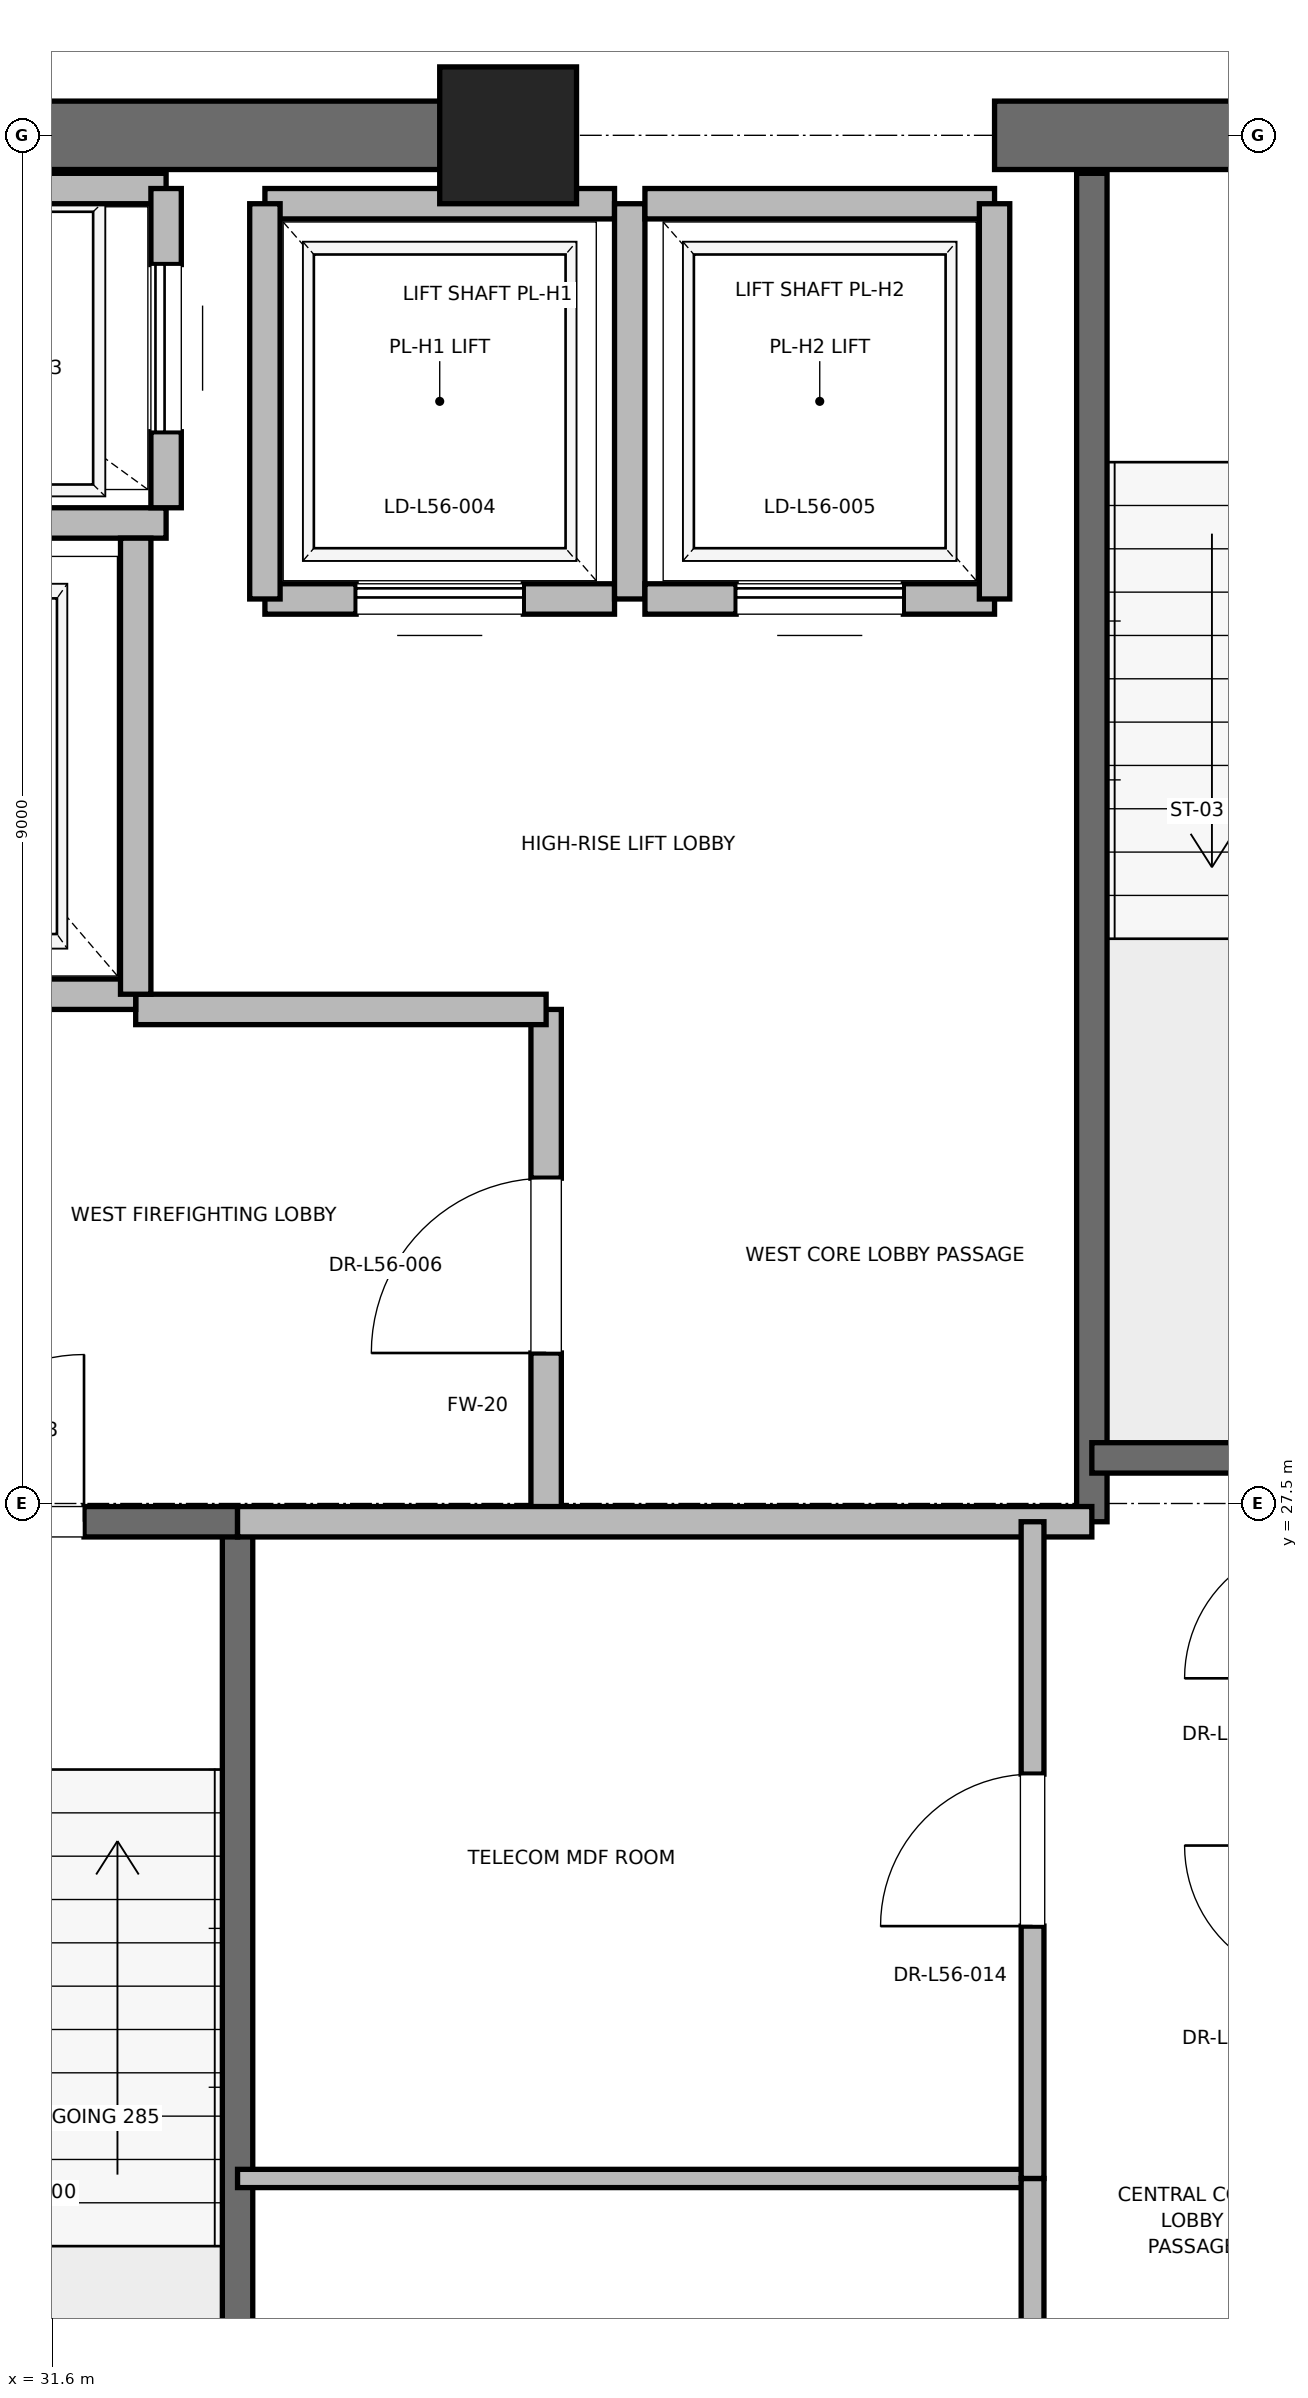
"""IFC4 building model, lengths in metres.
Left out: names, types, materials, properties, quantities, classifications, styles, units other than length and angle.
Written with IfcOpenShell. Run it as: python <this file> out.ifc"""

import sys

from ifc_helpers import new_model, si_unit, direction, frame, frame_2d, origin, origin_2d, place, context, subcontext, project, spatial, rectangle, extrude, element, fill, save


model = new_model("IFC4")
c1 = context("Model", 3, precision=1e-05, world=origin(), true_north=direction((0.0, 1.0)))
c2 = subcontext(c1, "Body", "Model", "MODEL_VIEW")
j1 = project(units=[si_unit("LENGTHUNIT", "METRE"), si_unit("PLANEANGLEUNIT", "RADIAN")], contexts=[c1])
p1 = place(None, origin())
s1 = spatial("IfcSite", under=j1, at=p1, CompositionType="ELEMENT")
p2 = place(p1, origin())
s2 = spatial("IfcBuilding", under=s1, at=p2, CompositionType="ELEMENT")
p3 = place(p2, frame((0.0, 0.0, 243.2)))
s3 = spatial("IfcBuildingStorey", under=s2, at=p3, CompositionType="ELEMENT", Elevation=243.2)
p4 = place(p3, frame((34.6, 36.5, 0.0), z_axis=(0.0, 0.0, 1.0), x_axis=(1.0, 0.0, 0.0)))
e1 = element("IfcColumn", 1, at=p4, inside=s3, PredefinedType="PILASTER", context=c2, shape_type="SweptSolid", body=[
    extrude(rectangle(XDim=0.9, YDim=0.9, at=origin_2d()), origin(), (0.0, 0.0, 1.0), 4.0),
])
p5 = place(p3, frame((29.0, 36.5, 0.0), z_axis=(0.0, 0.0, 1.0), x_axis=(1.0, 0.0, 0.0)))
e2 = element("IfcWall", 2, at=p5, inside=s3, PredefinedType="SHEAR", context=c2, shape_type="SweptSolid", body=[
    extrude(rectangle(XDim=5.8, YDim=0.45, at=frame_2d((2.9, 0.0))), origin(), (0.0, 0.0, 1.0), 3.785),
])
p6 = place(p3, frame((37.8, 36.5, 0.0), z_axis=(0.0, 0.0, 1.0), x_axis=(1.0, 0.0, 0.0)))
e3 = element("IfcWall", 3, at=p6, inside=s3, PredefinedType="SHEAR", context=c2, shape_type="SweptSolid", body=[
    extrude(rectangle(XDim=4.4, YDim=0.45, at=frame_2d((2.2, 0.0))), origin(), (0.0, 0.0, 1.0), 3.785),
])
p7 = place(p6, frame((1.65, 0.0, 0.0)))
e4 = element("IfcOpeningElement", 4, at=p7, cuts=e3, PredefinedType="OPENING", context=c2, shape_type="SweptSolid", body=[
    extrude(rectangle(XDim=1.1, YDim=2.15, at=frame_2d((0.55, 1.075))), frame((0.0, 0.225, 0.0), z_axis=(0.0, -1.0, 0.0), x_axis=(1.0, 0.0, 0.0)), (0.0, 0.0, 1.0), 0.45),
])
p8 = place(p3, frame((32.82, 18.6, 0.0), z_axis=(0.0, 0.0, 1.0), x_axis=(0.0, 1.0, 0.0)))
e5 = element("IfcWall", 5, at=p8, inside=s3, PredefinedType="SOLIDWALL", context=c2, shape_type="SweptSolid", body=[
    extrude(rectangle(XDim=8.78, YDim=0.2, at=frame_2d((4.39, 0.0))), origin(), (0.0, 0.0, 1.0), 3.785),
])
p9 = place(p3, frame((29.7, 27.38, 0.0), z_axis=(0.0, 0.0, 1.0), x_axis=(1.0, 0.0, 0.0)))
e6 = element("IfcWall", 6, at=p9, inside=s3, PredefinedType="SOLIDWALL", context=c2, shape_type="SweptSolid", body=[
    extrude(rectangle(XDim=3.12, YDim=0.2, at=frame_2d((1.56, 0.0))), origin(), (0.0, 0.0, 1.0), 3.785),
])
p10 = place(p9, frame((1.01, 0.0, 0.0)))
e7 = element("IfcOpeningElement", 7, at=p10, cuts=e6, PredefinedType="OPENING", context=c2, shape_type="SweptSolid", body=[
    extrude(rectangle(XDim=1.1, YDim=2.15, at=frame_2d((0.55, 1.075))), frame((0.0, 0.1, 0.0), z_axis=(0.0, -1.0, 0.0), x_axis=(1.0, 0.0, 0.0)), (0.0, 0.0, 1.0), 0.2),
])
p11 = place(p3, frame((38.44, 27.38, 0.0), z_axis=(0.0, 0.0, 1.0), x_axis=(0.0, 1.0, 0.0)))
e8 = element("IfcWall", 8, at=p11, inside=s3, PredefinedType="SOLIDWALL", context=c2, shape_type="SweptSolid", body=[
    extrude(rectangle(XDim=8.87, YDim=0.2, at=frame_2d((4.435, 0.0))), origin(), (0.0, 0.0, 1.0), 3.785),
])
p12 = place(p3, frame((38.44, 27.8, 0.0), z_axis=(0.0, 0.0, 1.0), x_axis=(1.0, 0.0, 0.0)))
e9 = element("IfcWall", 9, at=p12, inside=s3, PredefinedType="SOLIDWALL", context=c2, shape_type="SweptSolid", body=[
    extrude(rectangle(XDim=3.32, YDim=0.2, at=frame_2d((1.66, 0.0))), origin(), (0.0, 0.0, 1.0), 3.785),
])
p13 = place(p3, frame((34.85, 27.38, 0.0), z_axis=(0.0, 0.0, 1.0), x_axis=(0.0, 1.0, 0.0)))
e10 = element("IfcWall", 10, at=p13, inside=s3, PredefinedType="PARTITIONING", context=c2, shape_type="SweptSolid", body=[
    extrude(rectangle(XDim=3.37, YDim=0.2, at=frame_2d((1.685, 0.0))), origin(), (0.0, 0.0, 1.0), 3.785),
])
p14 = place(p13, frame((1.11, 0.0, 0.0)))
e11 = element("IfcOpeningElement", 11, at=p14, cuts=e10, PredefinedType="OPENING", context=c2, shape_type="SweptSolid", body=[
    extrude(rectangle(XDim=1.15, YDim=2.2, at=frame_2d((0.575, 1.1))), frame((0.0, 0.1, 0.0), z_axis=(0.0, -1.0, 0.0), x_axis=(1.0, 0.0, 0.0)), (0.0, 0.0, 1.0), 0.2),
])
p15 = place(p3, frame((32.82, 27.38, 0.0), z_axis=(0.0, 0.0, 1.0), x_axis=(1.0, 0.0, 0.0)))
e12 = element("IfcWall", 12, at=p15, inside=s3, PredefinedType="PARTITIONING", context=c2, shape_type="SweptSolid", body=[
    extrude(rectangle(XDim=5.62, YDim=0.2, at=frame_2d((2.81, 0.0))), origin(), (0.0, 0.0, 1.0), 3.785),
])
p16 = place(p3, frame((32.15, 30.75, 0.0), z_axis=(0.0, 0.0, 1.0), x_axis=(1.0, 0.0, 0.0)))
e13 = element("IfcWall", 13, at=p16, inside=s3, PredefinedType="PARTITIONING", context=c2, shape_type="SweptSolid", body=[
    extrude(rectangle(XDim=2.7, YDim=0.2, at=frame_2d((1.35, 0.0))), origin(), (0.0, 0.0, 1.0), 3.785),
])
p17 = place(p3, frame((29.55, 30.85, 0.0), z_axis=(0.0, 0.0, 1.0), x_axis=(1.0, 0.0, 0.0)))
e14 = element("IfcWall", 14, at=p17, inside=s3, PredefinedType="SOLIDWALL", context=c2, shape_type="SweptSolid", body=[
    extrude(rectangle(XDim=2.6, YDim=0.2, at=frame_2d((1.3, 0.0))), origin(), (0.0, 0.0, 1.0), 2.865),
])
p18 = place(p17, frame((0.75, 0.0, 0.0)))
e15 = element("IfcOpeningElement", 15, at=p18, cuts=e14, PredefinedType="OPENING", context=c2, shape_type="SweptSolid", body=[
    extrude(rectangle(XDim=1.1, YDim=2.2, at=frame_2d((0.55, 1.1))), frame((0.0, 0.1, 0.0), z_axis=(0.0, -1.0, 0.0), x_axis=(1.0, 0.0, 0.0)), (0.0, 0.0, 1.0), 0.2),
])
p19 = place(p3, frame((29.55, 33.95, 0.0), z_axis=(0.0, 0.0, 1.0), x_axis=(1.0, 0.0, 0.0)))
e16 = element("IfcWall", 16, at=p19, inside=s3, PredefinedType="SOLIDWALL", context=c2, shape_type="SweptSolid", body=[
    extrude(rectangle(XDim=2.8, YDim=0.2, at=frame_2d((1.4, 0.0))), origin(), (0.0, 0.0, 1.0), 3.785),
])
p20 = place(p3, frame((32.15, 30.85, 0.0), z_axis=(0.0, 0.0, 1.0), x_axis=(0.0, 1.0, 0.0)))
e17 = element("IfcWall", 17, at=p20, inside=s3, PredefinedType="SOLIDWALL", context=c2, shape_type="SweptSolid", body=[
    extrude(rectangle(XDim=3.0, YDim=0.2, at=frame_2d((1.5, 0.0))), origin(), (0.0, 0.0, 1.0), 3.785),
])
p21 = place(p3, frame((32.35, 36.15, 0.0), z_axis=(0.0, 0.0, 1.0), x_axis=(-1.0, 0.0, 0.0)))
e18 = element("IfcWall", 18, at=p21, inside=s3, PredefinedType="SOLIDWALL", context=c2, shape_type="SweptSolid", body=[
    extrude(rectangle(XDim=2.8, YDim=0.2, at=frame_2d((1.4, 0.0))), origin(), (0.0, 0.0, 1.0), 3.148),
])
p22 = place(p3, frame((32.35, 34.05, 0.0), z_axis=(0.0, 0.0, 1.0), x_axis=(0.0, 1.0, 0.0)))
e19 = element("IfcWall", 19, at=p22, inside=s3, PredefinedType="SOLIDWALL", context=c2, shape_type="SweptSolid", body=[
    extrude(rectangle(XDim=2.1, YDim=0.2, at=frame_2d((1.05, 0.0))), origin(), (0.0, 0.0, 1.0), 3.785),
])
p23 = place(p22, frame((0.5, 0.0, 0.0)))
e20 = element("IfcOpeningElement", 20, at=p23, cuts=e19, PredefinedType="OPENING", context=c2, shape_type="SweptSolid", body=[
    extrude(rectangle(XDim=1.1, YDim=2.2, at=frame_2d((0.55, 1.1))), frame((0.0, 0.1, 0.0), z_axis=(0.0, -1.0, 0.0), x_axis=(1.0, 0.0, 0.0)), (0.0, 0.0, 1.0), 0.2),
])
p24 = place(p3, frame((33.0, 33.45, 0.0), z_axis=(0.0, 0.0, 1.0), x_axis=(1.0, 0.0, 0.0)))
e21 = element("IfcWall", 21, at=p24, inside=s3, PredefinedType="SOLIDWALL", context=c2, shape_type="SweptSolid", body=[
    extrude(rectangle(XDim=2.3, YDim=0.2, at=frame_2d((1.15, 0.0))), origin(), (0.0, 0.0, 1.0), 3.785),
])
p25 = place(p24, frame((0.6, 0.0, 0.0)))
e22 = element("IfcOpeningElement", 22, at=p25, cuts=e21, PredefinedType="OPENING", context=c2, shape_type="SweptSolid", body=[
    extrude(rectangle(XDim=1.1, YDim=2.2, at=frame_2d((0.55, 1.1))), frame((0.0, 0.1, 0.0), z_axis=(0.0, -1.0, 0.0), x_axis=(1.0, 0.0, 0.0)), (0.0, 0.0, 1.0), 0.2),
])
p26 = place(p3, frame((35.3, 36.05, 0.0), z_axis=(0.0, 0.0, 1.0), x_axis=(-1.0, 0.0, 0.0)))
e23 = element("IfcWall", 23, at=p26, inside=s3, PredefinedType="SOLIDWALL", context=c2, shape_type="SweptSolid", body=[
    extrude(rectangle(XDim=2.3, YDim=0.2, at=frame_2d((1.15, 0.0))), origin(), (0.0, 0.0, 1.0), 2.865),
])
p27 = place(p3, frame((33.0, 36.05, 0.0), z_axis=(0.0, 0.0, 1.0), x_axis=(0.0, -1.0, 0.0)))
e24 = element("IfcWall", 24, at=p27, inside=s3, PredefinedType="SOLIDWALL", context=c2, shape_type="SweptSolid", body=[
    extrude(rectangle(XDim=2.6, YDim=0.2, at=frame_2d((1.3, 0.0))), origin(), (0.0, 0.0, 1.0), 3.785),
])
p28 = place(p3, frame((35.4, 33.45, 0.0), z_axis=(0.0, 0.0, 1.0), x_axis=(0.0, 1.0, 0.0)))
e25 = element("IfcWall", 25, at=p28, inside=s3, PredefinedType="SOLIDWALL", context=c2, shape_type="SweptSolid", body=[
    extrude(rectangle(XDim=2.6, YDim=0.2, at=frame_2d((1.3, 0.0))), origin(), (0.0, 0.0, 1.0), 2.865),
])
p29 = place(p3, frame((35.5, 33.45, 0.0), z_axis=(0.0, 0.0, 1.0), x_axis=(1.0, 0.0, 0.0)))
e26 = element("IfcWall", 26, at=p29, inside=s3, PredefinedType="SOLIDWALL", context=c2, shape_type="SweptSolid", body=[
    extrude(rectangle(XDim=2.3, YDim=0.2, at=frame_2d((1.15, 0.0))), origin(), (0.0, 0.0, 1.0), 3.785),
])
p30 = place(p29, frame((0.6, 0.0, 0.0)))
e27 = element("IfcOpeningElement", 27, at=p30, cuts=e26, PredefinedType="OPENING", context=c2, shape_type="SweptSolid", body=[
    extrude(rectangle(XDim=1.1, YDim=2.2, at=frame_2d((0.55, 1.1))), frame((0.0, 0.1, 0.0), z_axis=(0.0, -1.0, 0.0), x_axis=(1.0, 0.0, 0.0)), (0.0, 0.0, 1.0), 0.2),
])
p31 = place(p3, frame((37.8, 36.05, 0.0), z_axis=(0.0, 0.0, 1.0), x_axis=(-1.0, 0.0, 0.0)))
e28 = element("IfcWall", 28, at=p31, inside=s3, PredefinedType="SOLIDWALL", context=c2, shape_type="SweptSolid", body=[
    extrude(rectangle(XDim=2.3, YDim=0.2, at=frame_2d((1.15, 0.0))), origin(), (0.0, 0.0, 1.0), 2.865),
])
p32 = place(p3, frame((37.8, 33.45, 0.0), z_axis=(0.0, 0.0, 1.0), x_axis=(0.0, 1.0, 0.0)))
e29 = element("IfcWall", 29, at=p32, inside=s3, PredefinedType="SOLIDWALL", context=c2, shape_type="SweptSolid", body=[
    extrude(rectangle(XDim=2.6, YDim=0.2, at=frame_2d((1.3, 0.0))), origin(), (0.0, 0.0, 1.0), 2.865),
])
p33 = place(p3, frame((32.82, 23.06, 0.0), z_axis=(0.0, 0.0, 1.0), x_axis=(1.0, 0.0, 0.0)))
e30 = element("IfcWall", 30, at=p33, inside=s3, PredefinedType="PARTITIONING", context=c2, shape_type="SweptSolid", body=[
    extrude(rectangle(XDim=5.23, YDim=0.12, at=frame_2d((2.615, 0.0))), origin(), (0.0, 0.0, 1.0), 2.85),
])
p34 = place(p3, frame((38.05, 18.6, 0.0), z_axis=(0.0, 0.0, 1.0), x_axis=(0.0, 1.0, 0.0)))
e31 = element("IfcWall", 31, at=p34, inside=s3, PredefinedType="PARTITIONING", context=c2, shape_type="SweptSolid", body=[
    extrude(rectangle(XDim=4.46, YDim=0.15, at=frame_2d((2.23, 0.0))), origin(), (0.0, 0.0, 1.0), 2.85),
])
p35 = place(p34, frame((1.73, 0.0, 0.0)))
e32 = element("IfcOpeningElement", 32, at=p35, cuts=e31, PredefinedType="OPENING", context=c2, shape_type="SweptSolid", body=[
    extrude(rectangle(XDim=1.0, YDim=2.15, at=frame_2d((0.5, 1.075))), frame((0.0, 0.075, 0.0), z_axis=(0.0, -1.0, 0.0), x_axis=(1.0, 0.0, 0.0)), (0.0, 0.0, 1.0), 0.15),
])
p36 = place(p3, frame((38.05, 23.06, 0.0), z_axis=(0.0, 0.0, 1.0), x_axis=(0.0, 1.0, 0.0)))
e33 = element("IfcWall", 33, at=p36, inside=s3, PredefinedType="PARTITIONING", context=c2, shape_type="SweptSolid", body=[
    extrude(rectangle(XDim=4.32, YDim=0.15, at=frame_2d((2.16, 0.0))), origin(), (0.0, 0.0, 1.0), 2.85),
])
p37 = place(p36, frame((1.66, 0.0, 0.0)))
e34 = element("IfcOpeningElement", 34, at=p37, cuts=e33, PredefinedType="OPENING", context=c2, shape_type="SweptSolid", body=[
    extrude(rectangle(XDim=1.0, YDim=2.15, at=frame_2d((0.5, 1.075))), frame((0.0, 0.075, 0.0), z_axis=(0.0, -1.0, 0.0), x_axis=(1.0, 0.0, 0.0)), (0.0, 0.0, 1.0), 0.15),
])
p38 = place(p10, origin())
e35 = element("IfcDoor", 35, at=p38, inside=s3, OperationType="SINGLE_SWING_RIGHT", PredefinedType="DOOR", context=c2, shape_type="SweptSolid", body=[
    extrude(rectangle(XDim=1.1, YDim=2.15, at=frame_2d((0.55, 1.075))), frame((0.0, 0.025, 0.0), z_axis=(0.0, -1.0, 0.0), x_axis=(1.0, 0.0, 0.0)), (0.0, 0.0, 1.0), 0.05),
])
fill(e7, e35)
p39 = place(p14, origin())
e36 = element("IfcDoor", 36, at=p39, inside=s3, OperationType="SINGLE_SWING_LEFT", PredefinedType="DOOR", context=c2, shape_type="SweptSolid", body=[
    extrude(rectangle(XDim=1.15, YDim=2.2, at=frame_2d((0.575, 1.1))), frame((0.0, 0.025, 0.0), z_axis=(0.0, -1.0, 0.0), x_axis=(1.0, 0.0, 0.0)), (0.0, 0.0, 1.0), 0.05),
])
fill(e11, e36)
p40 = place(p23, origin())
e37 = element("IfcDoor", 37, at=p40, inside=s3, OperationType="SLIDING_TO_RIGHT", PredefinedType="DOOR", context=c2, shape_type="SweptSolid", body=[
    extrude(rectangle(XDim=1.1, YDim=2.2, at=frame_2d((0.55, 1.1))), frame((0.0, 0.025, 0.0), z_axis=(0.0, -1.0, 0.0), x_axis=(1.0, 0.0, 0.0)), (0.0, 0.0, 1.0), 0.05),
])
fill(e20, e37)
p41 = place(p25, origin())
e38 = element("IfcDoor", 38, at=p41, inside=s3, OperationType="SLIDING_TO_RIGHT", PredefinedType="DOOR", context=c2, shape_type="SweptSolid", body=[
    extrude(rectangle(XDim=1.1, YDim=2.2, at=frame_2d((0.55, 1.1))), frame((0.0, 0.025, 0.0), z_axis=(0.0, -1.0, 0.0), x_axis=(1.0, 0.0, 0.0)), (0.0, 0.0, 1.0), 0.05),
])
fill(e22, e38)
p42 = place(p30, origin())
e39 = element("IfcDoor", 39, at=p42, inside=s3, OperationType="SLIDING_TO_RIGHT", PredefinedType="DOOR", context=c2, shape_type="SweptSolid", body=[
    extrude(rectangle(XDim=1.1, YDim=2.2, at=frame_2d((0.55, 1.1))), frame((0.0, 0.025, 0.0), z_axis=(0.0, -1.0, 0.0), x_axis=(1.0, 0.0, 0.0)), (0.0, 0.0, 1.0), 0.05),
])
fill(e27, e39)
p43 = place(p37, origin())
e40 = element("IfcDoor", 40, at=p43, inside=s3, OperationType="SINGLE_SWING_LEFT", PredefinedType="DOOR", context=c2, shape_type="SweptSolid", body=[
    extrude(rectangle(XDim=1.0, YDim=2.15, at=frame_2d((0.5, 1.075))), frame((0.0, 0.025, 0.0), z_axis=(0.0, -1.0, 0.0), x_axis=(1.0, 0.0, 0.0)), (0.0, 0.0, 1.0), 0.05),
])
fill(e34, e40)
save(model, sys.argv[1])
